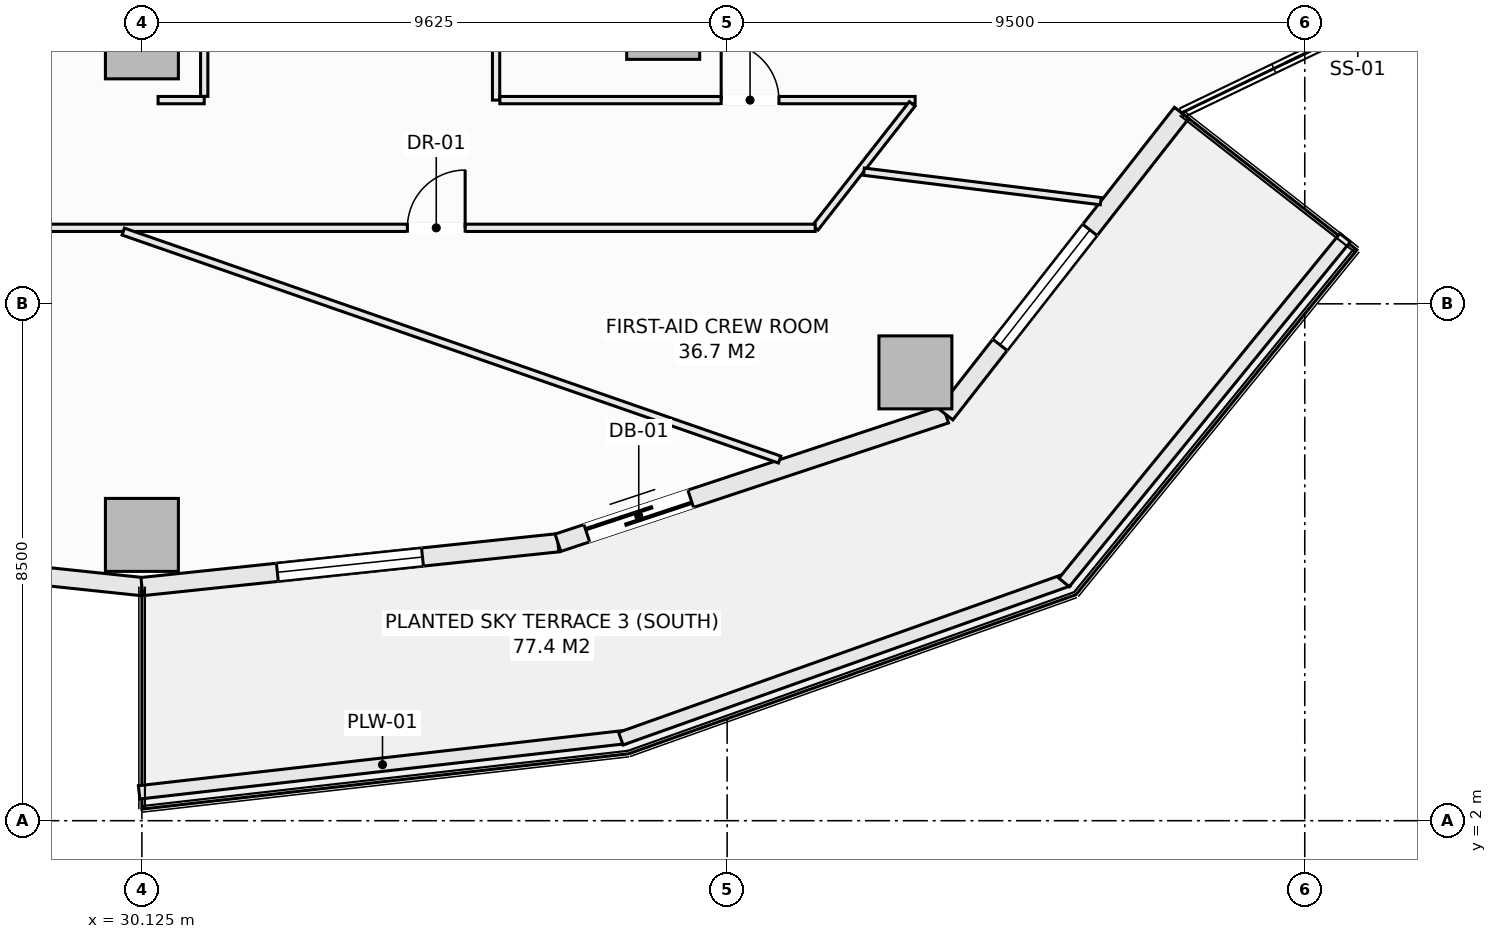
"""IFC4 building model, lengths in metres.
Left out: names, types, materials, properties, quantities, classifications, styles, units other than length and angle.
Written with IfcOpenShell. Run it as: python <this file> out.ifc"""

import sys

from ifc_helpers import new_model, si_unit, direction, frame, frame_2d, origin, origin_2d, place, context, subcontext, project, spatial, rectangle, extrude, element, fill, save


model = new_model("IFC4")
c1 = context("Model", 3, precision=1e-05, world=origin(), true_north=direction((0.0, 1.0)))
c2 = subcontext(c1, "Body", "Model", "MODEL_VIEW")
j1 = project(units=[si_unit("LENGTHUNIT", "METRE"), si_unit("PLANEANGLEUNIT", "RADIAN")], contexts=[c1])
p1 = place(None, origin())
s1 = spatial("IfcSite", under=j1, at=p1, CompositionType="ELEMENT")
p2 = place(p1, origin())
s2 = spatial("IfcBuilding", under=s1, at=p2, CompositionType="ELEMENT")
p3 = place(p2, frame((0.0, 0.0, 76.55)))
s3 = spatial("IfcBuildingStorey", under=s2, at=p3, CompositionType="ELEMENT", Elevation=76.55)
for number, where, z_axis, x_axis in (
    (1, (30.125, 6.7, -0.28), (0.0, 0.0, 1.0), (1.0, 0.0, 0.0)),
    (2, (42.846, 9.373, -0.28), (0.0, 0.0, 1.0), (1.0, 0.0, 0.0)),
    (3, (30.125, 14.8, -0.28), (0.0, 0.0, 1.0), (1.0, 0.0, 0.0)),
    (4, (38.698, 15.121, -0.28), (0.0, 0.0, 1.0), (1.0, 0.0, 0.0)),
):
    element("IfcColumn", number, at=place(p3, frame(where, z_axis=z_axis, x_axis=x_axis)), inside=s3, PredefinedType="COLUMN", context=c2, shape_type="SweptSolid", body=[
        extrude(rectangle(XDim=1.2, YDim=1.2, at=origin_2d()), origin(), (0.0, 0.0, 1.0), 3.85),
    ])
p4 = place(p3, frame((23.282, 6.571, 0.0), z_axis=(0.0, 0.0, 1.0), x_axis=(0.994498840295, -0.104747585419, 0.0)))
e5 = element("IfcWall", 5, at=p4, inside=s3, PredefinedType="SOLIDWALL", context=c2, shape_type="SweptSolid", body=[
    extrude(rectangle(XDim=6.88, YDim=0.3, at=frame_2d((3.44, 0.0))), origin(), (0.0, 0.0, 1.0), 3.093),
])
p5 = place(p4, frame((2.24, 0.0, 0.85)))
e6 = element("IfcOpeningElement", 6, at=p5, cuts=e5, PredefinedType="OPENING", context=c2, shape_type="SweptSolid", body=[
    extrude(rectangle(XDim=2.4, YDim=1.9, at=frame_2d((1.2, 0.95))), frame((0.0, 0.16, 0.0), z_axis=(0.0, -1.0, 0.0), x_axis=(1.0, 0.0, 0.0)), (0.0, 0.0, 1.0), 0.32),
])
p6 = place(p3, frame((30.125, 5.85, 0.0), z_axis=(0.0, 0.0, 1.0), x_axis=(0.994498840295, 0.104747585419, 0.0)))
e7 = element("IfcWall", 7, at=p6, inside=s3, PredefinedType="SOLIDWALL", context=c2, shape_type="SweptSolid", body=[
    extrude(rectangle(XDim=6.88, YDim=0.3, at=frame_2d((3.44, 0.0))), origin(), (0.0, 0.0, 1.0), 3.093),
])
p7 = place(p6, frame((2.24, 0.0, 0.85)))
e8 = element("IfcOpeningElement", 8, at=p7, cuts=e7, PredefinedType="OPENING", context=c2, shape_type="SweptSolid", body=[
    extrude(rectangle(XDim=2.4, YDim=1.9, at=frame_2d((1.2, 0.95))), frame((0.0, 0.16, 0.0), z_axis=(0.0, -1.0, 0.0), x_axis=(1.0, 0.0, 0.0)), (0.0, 0.0, 1.0), 0.32),
])
p8 = place(p3, frame((36.968, 6.571, 0.0), z_axis=(0.0, 0.0, 1.0), x_axis=(0.949245153629, 0.314537181127, 0.0)))
e9 = element("IfcWall", 9, at=p8, inside=s3, PredefinedType="SOLIDWALL", context=c2, shape_type="SweptSolid", body=[
    extrude(rectangle(XDim=6.717, YDim=0.3, at=frame_2d((3.358, 0.0))), origin(), (0.0, 0.0, 1.0), 3.093),
])
p9 = place(p8, frame((0.5, 0.0, 0.0)))
e10 = element("IfcOpeningElement", 10, at=p9, cuts=e9, PredefinedType="OPENING", context=c2, shape_type="SweptSolid", body=[
    extrude(rectangle(XDim=1.8, YDim=2.25, at=frame_2d((0.9, 1.125))), frame((0.0, 0.16, 0.0), z_axis=(0.0, -1.0, 0.0), x_axis=(1.0, 0.0, 0.0)), (0.0, 0.0, 1.0), 0.32),
])
p10 = place(p3, frame((43.344, 8.684, 0.0), z_axis=(0.0, 0.0, 1.0), x_axis=(0.616434798832, 0.78740595552, 0.0)))
e11 = element("IfcWall", 11, at=p10, inside=s3, PredefinedType="SOLIDWALL", context=c2, shape_type="SweptSolid", body=[
    extrude(rectangle(XDim=6.294, YDim=0.3, at=frame_2d((3.147, 0.0))), origin(), (0.0, 0.0, 1.0), 3.093),
])
p11 = place(p10, frame((1.45, 0.0, 0.85)))
e12 = element("IfcOpeningElement", 12, at=p11, cuts=e11, PredefinedType="OPENING", context=c2, shape_type="SweptSolid", body=[
    extrude(rectangle(XDim=2.4, YDim=1.9, at=frame_2d((1.2, 0.95))), frame((0.0, 0.16, 0.0), z_axis=(0.0, -1.0, 0.0), x_axis=(1.0, 0.0, 0.0)), (0.0, 0.0, 1.0), 0.32),
])
p12 = place(p3, frame((30.08, 2.466, 0.0), z_axis=(0.0, 0.0, 1.0), x_axis=(0.993598144351, 0.112972242349, 0.0)))
e13 = element("IfcWall", 13, at=p12, inside=s3, PredefinedType="PARAPET", context=c2, shape_type="SweptSolid", body=[
    extrude(rectangle(XDim=8.056, YDim=0.22, at=frame_2d((4.028, 0.0))), origin(), (0.0, 0.0, 1.0), 0.52),
])
p13 = place(p3, frame((38.001, 3.349, 0.0), z_axis=(0.0, 0.0, 1.0), x_axis=(0.942203722205, 0.335040513764, 0.0)))
e14 = element("IfcWall", 14, at=p13, inside=s3, PredefinedType="PARAPET", context=c2, shape_type="SweptSolid", body=[
    extrude(rectangle(XDim=7.807, YDim=0.22, at=frame_2d((3.904, 0.0))), origin(), (0.0, 0.0, 1.0), 0.52),
])
p14 = place(p3, frame((45.292, 5.918, 0.0), z_axis=(0.0, 0.0, 1.0), x_axis=(0.631819273026, 0.775115737315, 0.0)))
e15 = element("IfcWall", 15, at=p14, inside=s3, PredefinedType="PARAPET", context=c2, shape_type="SweptSolid", body=[
    extrude(rectangle(XDim=7.316, YDim=0.22, at=frame_2d((3.658, 0.0))), origin(), (0.0, 0.0, 1.0), 0.52),
])
p15 = place(p3, frame((35.95, 13.85, 0.0), z_axis=(0.0, 0.0, 1.0), x_axis=(0.0, 1.0, 0.0)))
e16 = element("IfcWall", 16, at=p15, inside=s3, PredefinedType="PARTITIONING", context=c2, shape_type="SweptSolid", body=[
    extrude(rectangle(XDim=1.738, YDim=0.12, at=frame_2d((0.869, 0.0))), origin(), (0.0, 0.0, 1.0), 3.57),
])
p16 = place(p3, frame((30.391, 13.85, 0.0), z_axis=(0.0, 0.0, 1.0), x_axis=(1.0, 0.0, 0.0)))
e17 = element("IfcWall", 17, at=p16, inside=s3, PredefinedType="PARTITIONING", context=c2, shape_type="SweptSolid", body=[
    extrude(rectangle(XDim=0.759, YDim=0.12, at=frame_2d((0.379, 0.0))), origin(), (0.0, 0.0, 1.0), 3.57),
])
p17 = place(p3, frame((36.012, 13.85, 0.0), z_axis=(0.0, 0.0, 1.0), x_axis=(1.0, 0.0, 0.0)))
e18 = element("IfcWall", 18, at=p17, inside=s3, PredefinedType="PARTITIONING", context=c2, shape_type="SweptSolid", body=[
    extrude(rectangle(XDim=6.83, YDim=0.12, at=frame_2d((3.415, 0.0))), origin(), (0.0, 0.0, 1.0), 3.57),
])
p18 = place(p17, frame((3.64, 0.0, 0.0)))
e19 = element("IfcOpeningElement", 19, at=p18, cuts=e18, PredefinedType="OPENING", context=c2, shape_type="SweptSolid", body=[
    extrude(rectangle(XDim=0.95, YDim=2.1, at=frame_2d((0.475, 1.05))), frame((0.0, 0.07, 0.0), z_axis=(0.0, -1.0, 0.0), x_axis=(1.0, 0.0, 0.0)), (0.0, 0.0, 1.0), 0.14),
])
p19 = place(p3, frame((41.198, 11.75, 0.0), z_axis=(0.0, 0.0, 1.0), x_axis=(0.616412533256, 0.787423386016, 0.0)))
e20 = element("IfcWall", 20, at=p19, inside=s3, PredefinedType="PARTITIONING", context=c2, shape_type="SweptSolid", body=[
    extrude(rectangle(XDim=2.588, YDim=0.12, at=frame_2d((1.294, 0.0))), origin(), (0.0, 0.0, 1.0), 3.57),
])
p20 = place(p3, frame((23.4, 11.75, 0.0), z_axis=(0.0, 0.0, 1.0), x_axis=(1.0, 0.0, 0.0)))
e21 = element("IfcWall", 21, at=p20, inside=s3, PredefinedType="PARTITIONING", context=c2, shape_type="SweptSolid", body=[
    extrude(rectangle(XDim=17.798, YDim=0.12, at=frame_2d((8.899, 0.0))), origin(), (0.0, 0.0, 1.0), 3.57),
])
p21 = place(p20, frame((3.094, 0.0, 0.0)))
e22 = element("IfcOpeningElement", 22, at=p21, cuts=e21, PredefinedType="OPENING", context=c2, shape_type="SweptSolid", body=[
    extrude(rectangle(XDim=0.95, YDim=2.1, at=frame_2d((0.475, 1.05))), frame((0.0, 0.07, 0.0), z_axis=(0.0, -1.0, 0.0), x_axis=(1.0, 0.0, 0.0)), (0.0, 0.0, 1.0), 0.14),
])
p22 = place(p20, frame((11.091, 0.0, 0.0)))
e23 = element("IfcOpeningElement", 23, at=p22, cuts=e21, PredefinedType="OPENING", context=c2, shape_type="SweptSolid", body=[
    extrude(rectangle(XDim=0.95, YDim=2.1, at=frame_2d((0.475, 1.05))), frame((0.0, 0.07, 0.0), z_axis=(0.0, -1.0, 0.0), x_axis=(1.0, 0.0, 0.0)), (0.0, 0.0, 1.0), 0.14),
])
p23 = place(p3, frame((31.15, 13.912, 0.0), z_axis=(0.0, 0.0, 1.0), x_axis=(0.0, 1.0, 0.0)))
e24 = element("IfcWall", 24, at=p23, inside=s3, PredefinedType="PARTITIONING", context=c2, shape_type="SweptSolid", body=[
    extrude(rectangle(XDim=1.676, YDim=0.12, at=frame_2d((0.838, 0.0))), origin(), (0.0, 0.0, 1.0), 3.57),
])
p24 = place(p3, frame((42.0, 12.674, 0.0), z_axis=(0.0, 0.0, 1.0), x_axis=(0.992316110302, -0.123728481908, 0.0)))
e25 = element("IfcWall", 25, at=p24, inside=s3, PredefinedType="PARTITIONING", context=c2, shape_type="SweptSolid", body=[
    extrude(rectangle(XDim=3.925, YDim=0.12, at=frame_2d((1.962, 0.0))), origin(), (0.0, 0.0, 1.0), 3.57),
])
p25 = place(p3, frame((29.818, 11.688, 0.0), z_axis=(0.0, 0.0, 1.0), x_axis=(0.944668147769, -0.328027575961, 0.0)))
e26 = element("IfcWall", 26, at=p25, inside=s3, PredefinedType="PARTITIONING", context=c2, shape_type="SweptSolid", body=[
    extrude(rectangle(XDim=11.428, YDim=0.12, at=frame_2d((5.714, 0.0))), origin(), (0.0, 0.0, 1.0), 3.093),
])
p26 = place(p7, origin())
e27 = element("IfcWindow", 27, at=p26, inside=s3, PartitioningType="SINGLE_PANEL", PredefinedType="WINDOW", context=c2, shape_type="SweptSolid", body=[
    extrude(rectangle(XDim=2.4, YDim=1.9, at=frame_2d((1.2, 0.95))), frame((0.0, 0.03, 0.0), z_axis=(0.0, -1.0, 0.0), x_axis=(1.0, 0.0, 0.0)), (0.0, 0.0, 1.0), 0.06),
])
fill(e8, e27)
p27 = place(p9, frame((1.8, 0.0, 0.0), z_axis=(0.0, 0.0, 1.0), x_axis=(-1.0, 0.0, 0.0)))
e28 = element("IfcDoor", 28, at=p27, inside=s3, OperationType="SLIDING_TO_LEFT", PredefinedType="DOOR", context=c2, shape_type="SweptSolid", body=[
    extrude(rectangle(XDim=1.8, YDim=2.25, at=frame_2d((0.9, 1.125))), frame((0.0, 0.025, 0.0), z_axis=(0.0, -1.0, 0.0), x_axis=(1.0, 0.0, 0.0)), (0.0, 0.0, 1.0), 0.05),
])
fill(e10, e28)
p28 = place(p11, origin())
e29 = element("IfcWindow", 29, at=p28, inside=s3, PartitioningType="SINGLE_PANEL", PredefinedType="WINDOW", context=c2, shape_type="SweptSolid", body=[
    extrude(rectangle(XDim=2.4, YDim=1.9, at=frame_2d((1.2, 0.95))), frame((0.0, 0.03, 0.0), z_axis=(0.0, -1.0, 0.0), x_axis=(1.0, 0.0, 0.0)), (0.0, 0.0, 1.0), 0.06),
])
fill(e12, e29)
p29 = place(p22, origin())
e30 = element("IfcDoor", 30, at=p29, inside=s3, OperationType="SINGLE_SWING_RIGHT", PredefinedType="DOOR", context=c2, shape_type="SweptSolid", body=[
    extrude(rectangle(XDim=0.95, YDim=2.1, at=frame_2d((0.475, 1.05))), frame((0.0, 0.025, 0.0), z_axis=(0.0, -1.0, 0.0), x_axis=(1.0, 0.0, 0.0)), (0.0, 0.0, 1.0), 0.05),
])
fill(e23, e30)
p30 = place(p18, origin())
e31 = element("IfcDoor", 31, at=p30, inside=s3, OperationType="SINGLE_SWING_LEFT", PredefinedType="DOOR", context=c2, shape_type="SweptSolid", body=[
    extrude(rectangle(XDim=0.95, YDim=2.1, at=frame_2d((0.475, 1.05))), frame((0.0, 0.025, 0.0), z_axis=(0.0, -1.0, 0.0), x_axis=(1.0, 0.0, 0.0)), (0.0, 0.0, 1.0), 0.05),
])
fill(e19, e31)
save(model, sys.argv[1])
